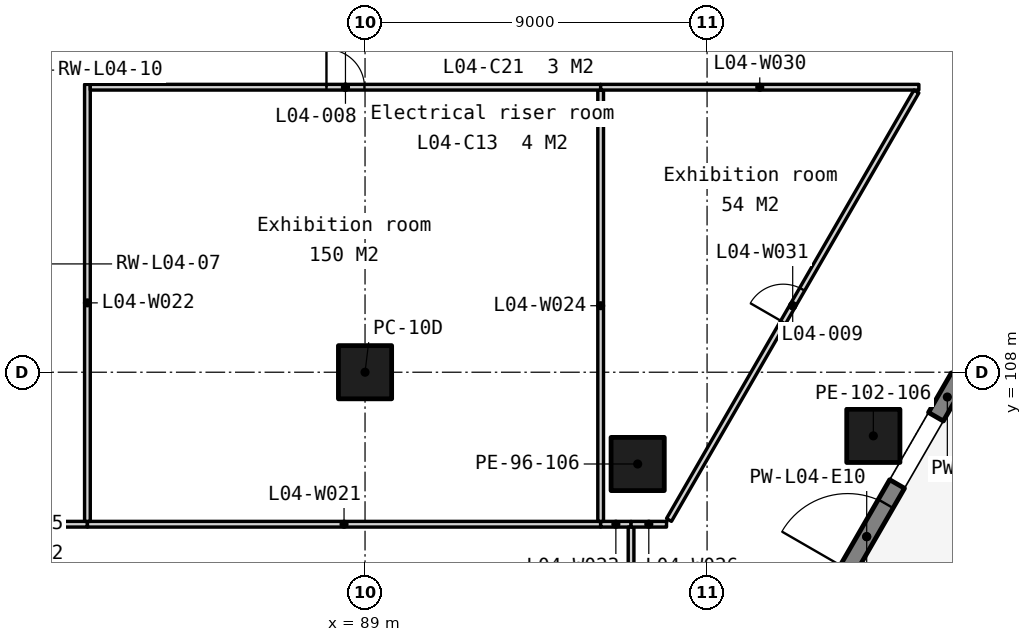
"""IFC4 building model, lengths in metres.
Left out: names, types, materials, properties, quantities, classifications, styles, units other than length and angle.
Written with IfcOpenShell. Run it as: python <this file> out.ifc"""

import sys

from ifc_helpers import new_model, si_unit, direction, frame, frame_2d, origin, origin_2d, place, context, subcontext, project, spatial, rectangle, extrude, element, fill, save


model = new_model("IFC4")
c1 = context("Model", 3, precision=1e-05, world=origin(), true_north=direction((0.0, 1.0)))
c2 = subcontext(c1, "Body", "Model", "MODEL_VIEW")
j1 = project(units=[si_unit("LENGTHUNIT", "METRE"), si_unit("PLANEANGLEUNIT", "RADIAN")], contexts=[c1])
p1 = place(None, origin())
s1 = spatial("IfcSite", under=j1, at=p1, CompositionType="ELEMENT")
p2 = place(p1, origin())
s2 = spatial("IfcBuilding", under=s1, at=p2, CompositionType="ELEMENT")
p3 = place(p2, frame((0.0, 0.0, 25.0)))
s3 = spatial("IfcBuildingStorey", under=s2, at=p3, CompositionType="ELEMENT", Elevation=25.0)
for number, where, z_axis, x_axis in (
    (1, (89.0, 108.0, 0.0), (0.0, 0.0, 1.0), (1.0, 0.0, 0.0)),
    (2, (102.375, 106.325, 0.0), (0.0, 0.0, 1.0), (1.0, 0.0, 0.0)),
    (3, (96.174, 105.585, 0.0), (0.0, 0.0, 1.0), (1.0, 0.0, 0.0)),
):
    element("IfcColumn", number, at=place(p3, frame(where, z_axis=z_axis, x_axis=x_axis)), inside=s3, PredefinedType="COLUMN", context=c2, shape_type="SweptSolid", body=[
        extrude(rectangle(XDim=1.4, YDim=1.4, at=origin_2d()), origin(), (0.0, 0.0, 1.0), 5.0),
    ])
p4 = place(p3, frame((101.4, 102.287, -0.25), z_axis=(0.0, 0.0, 1.0), x_axis=(0.499971222258, 0.866042017984, 0.0)))
e4 = element("IfcWall", 4, at=p4, inside=s3, PredefinedType="SOLIDWALL", context=c2, shape_type="SweptSolid", body=[
    extrude(rectangle(XDim=3.2, YDim=0.45, at=frame_2d((1.6, 0.0))), origin(), (0.0, 0.0, 1.0), 4.262),
])
p5 = place(p4, frame((0.6, 0.0, 0.25)))
e5 = element("IfcOpeningElement", 5, at=p5, cuts=e4, PredefinedType="OPENING", context=c2, shape_type="SweptSolid", body=[
    extrude(rectangle(XDim=2.0, YDim=2.4, at=frame_2d((1.0, 1.2))), frame((0.0, 0.235, 0.0), z_axis=(0.0, -1.0, 0.0), x_axis=(1.0, 0.0, 0.0)), (0.0, 0.0, 1.0), 0.47),
])
p6 = place(p3, frame((104.022, 106.828, -0.25), z_axis=(0.0, 0.0, 1.0), x_axis=(0.500033551112, 0.866006032174, 0.0)))
e6 = element("IfcWall", 6, at=p6, inside=s3, PredefinedType="SOLIDWALL", context=c2, shape_type="SweptSolid", body=[
    extrude(rectangle(XDim=1.2, YDim=0.45, at=frame_2d((0.6, 0.0))), origin(), (0.0, 0.0, 1.0), 4.262),
])
p7 = place(p3, frame((121.754, 129.091, 0.0), z_axis=(0.0, 0.0, 1.0), x_axis=(-0.500000102728, -0.866025344474, 0.0)))
e7 = element("IfcWall", 7, at=p7, inside=s3, PredefinedType="STANDARD", context=c2, shape_type="SweptSolid", body=[
    extrude(rectangle(XDim=77.841, YDim=1.0, at=frame_2d((38.92, 0.0))), origin(), (0.0, 0.0, 1.0), 0.6),
])
p8 = place(p3, frame((64.8, 104.0, 0.0), z_axis=(0.0, 0.0, 1.0), x_axis=(1.0, 0.0, 0.0)))
e8 = element("IfcWall", 8, at=p8, inside=s3, PredefinedType="PARTITIONING", context=c2, shape_type="SweptSolid", body=[
    extrude(rectangle(XDim=16.895, YDim=0.15, at=frame_2d((8.448, 0.0))), origin(), (0.0, 0.0, 1.0), 4.7),
])
p9 = place(p8, frame((7.548, 0.0, 0.0)))
e9 = element("IfcOpeningElement", 9, at=p9, cuts=e8, PredefinedType="OPENING", context=c2, shape_type="SweptSolid", body=[
    extrude(rectangle(XDim=1.8, YDim=2.1, at=frame_2d((0.9, 1.05))), frame((0.0, 0.085, 0.0), z_axis=(0.0, -1.0, 0.0), x_axis=(1.0, 0.0, 0.0)), (0.0, 0.0, 1.0), 0.17),
])
p10 = place(p3, frame((81.695, 104.0, 0.0), z_axis=(0.0, 0.0, 1.0), x_axis=(1.0, 0.0, 0.0)))
e10 = element("IfcWall", 10, at=p10, inside=s3, PredefinedType="PARTITIONING", context=c2, shape_type="SweptSolid", body=[
    extrude(rectangle(XDim=13.505, YDim=0.15, at=frame_2d((6.752, 0.0))), origin(), (0.0, 0.0, 1.0), 4.7),
])
p11 = place(p3, frame((81.695, 104.075, 0.0), z_axis=(0.0, 0.0, 1.0), x_axis=(0.0, 1.0, 0.0)))
e11 = element("IfcWall", 11, at=p11, inside=s3, PredefinedType="PARTITIONING", context=c2, shape_type="SweptSolid", body=[
    extrude(rectangle(XDim=11.5, YDim=0.15, at=frame_2d((5.75, 0.0))), origin(), (0.0, 0.0, 1.0), 4.7),
])
p12 = place(p3, frame((95.2, 104.0, 0.0), z_axis=(0.0, 0.0, 1.0), x_axis=(1.0, 0.0, 0.0)))
e12 = element("IfcWall", 12, at=p12, inside=s3, PredefinedType="PARTITIONING", context=c2, shape_type="SweptSolid", body=[
    extrude(rectangle(XDim=0.8, YDim=0.15, at=frame_2d((0.4, 0.0))), origin(), (0.0, 0.0, 1.0), 4.7),
])
p13 = place(p3, frame((95.2, 104.075, 0.0), z_axis=(0.0, 0.0, 1.0), x_axis=(0.0, 1.0, 0.0)))
e13 = element("IfcWall", 13, at=p13, inside=s3, PredefinedType="PARTITIONING", context=c2, shape_type="SweptSolid", body=[
    extrude(rectangle(XDim=11.35, YDim=0.15, at=frame_2d((5.675, 0.0))), origin(), (0.0, 0.0, 1.0), 4.7),
])
p14 = place(p3, frame((96.0, 101.763, 0.0), z_axis=(0.0, 0.0, 1.0), x_axis=(0.0, 1.0, 0.0)))
e14 = element("IfcWall", 14, at=p14, inside=s3, PredefinedType="PARTITIONING", context=c2, shape_type="SweptSolid", body=[
    extrude(rectangle(XDim=2.162, YDim=0.15, at=frame_2d((1.081, 0.0))), origin(), (0.0, 0.0, 1.0), 4.7),
])
p15 = place(p3, frame((96.0, 104.0, 0.0), z_axis=(0.0, 0.0, 1.0), x_axis=(1.0, 0.0, 0.0)))
e15 = element("IfcWall", 15, at=p15, inside=s3, PredefinedType="PARTITIONING", context=c2, shape_type="SweptSolid", body=[
    extrude(rectangle(XDim=0.933, YDim=0.15, at=frame_2d((0.467, 0.0))), origin(), (0.0, 0.0, 1.0), 4.7),
])
p16 = place(p3, frame((81.77, 115.5, 0.0), z_axis=(0.0, 0.0, 1.0), x_axis=(1.0, 0.0, 0.0)))
e16 = element("IfcWall", 16, at=p16, inside=s3, PredefinedType="PARTITIONING", context=c2, shape_type="SweptSolid", body=[
    extrude(rectangle(XDim=13.43, YDim=0.15, at=frame_2d((6.715, 0.0))), origin(), (0.0, 0.0, 1.0), 4.7),
])
p17 = place(p16, frame((6.215, 0.0, 0.0)))
e17 = element("IfcOpeningElement", 17, at=p17, cuts=e16, PredefinedType="OPENING", context=c2, shape_type="SweptSolid", body=[
    extrude(rectangle(XDim=1.0, YDim=2.1, at=frame_2d((0.5, 1.05))), frame((0.0, 0.085, 0.0), z_axis=(0.0, -1.0, 0.0), x_axis=(1.0, 0.0, 0.0)), (0.0, 0.0, 1.0), 0.17),
])
p18 = place(p3, frame((95.2, 115.5, 0.0), z_axis=(0.0, 0.0, 1.0), x_axis=(1.0, 0.0, 0.0)))
e18 = element("IfcWall", 18, at=p18, inside=s3, PredefinedType="PARTITIONING", context=c2, shape_type="SweptSolid", body=[
    extrude(rectangle(XDim=8.373, YDim=0.15, at=frame_2d((4.187, 0.0))), origin(), (0.0, 0.0, 1.0), 4.7),
])
p19 = place(p3, frame((96.998, 104.113, 0.0), z_axis=(0.0, 0.0, 1.0), x_axis=(0.500011390128, 0.866018827591, 0.0)))
e19 = element("IfcWall", 19, at=p19, inside=s3, PredefinedType="PARTITIONING", context=c2, shape_type="SweptSolid", body=[
    extrude(rectangle(XDim=13.019, YDim=0.15, at=frame_2d((6.51, 0.0))), origin(), (0.0, 0.0, 1.0), 4.7),
])
p20 = place(p19, frame((6.01, 0.0, 0.0)))
e20 = element("IfcOpeningElement", 20, at=p20, cuts=e19, PredefinedType="OPENING", context=c2, shape_type="SweptSolid", body=[
    extrude(rectangle(XDim=1.0, YDim=2.1, at=frame_2d((0.5, 1.05))), frame((0.0, 0.085, 0.0), z_axis=(0.0, -1.0, 0.0), x_axis=(1.0, 0.0, 0.0)), (0.0, 0.0, 1.0), 0.17),
])
p21 = place(p5, origin())
e21 = element("IfcDoor", 21, at=p21, inside=s3, OperationType="DOUBLE_DOOR_SINGLE_SWING", PredefinedType="DOOR", context=c2, shape_type="SweptSolid", body=[
    extrude(rectangle(XDim=2.0, YDim=2.4, at=frame_2d((1.0, 1.2))), frame((0.0, 0.025, 0.0), z_axis=(0.0, -1.0, 0.0), x_axis=(1.0, 0.0, 0.0)), (0.0, 0.0, 1.0), 0.05),
])
fill(e5, e21)
p22 = place(p17, origin())
e22 = element("IfcDoor", 22, at=p22, inside=s3, OperationType="SINGLE_SWING_LEFT", PredefinedType="DOOR", context=c2, shape_type="SweptSolid", body=[
    extrude(rectangle(XDim=1.0, YDim=2.1, at=frame_2d((0.5, 1.05))), frame((0.0, 0.025, 0.0), z_axis=(0.0, -1.0, 0.0), x_axis=(1.0, 0.0, 0.0)), (0.0, 0.0, 1.0), 0.05),
])
fill(e17, e22)
p23 = place(p20, origin())
e23 = element("IfcDoor", 23, at=p23, inside=s3, OperationType="SINGLE_SWING_LEFT", PredefinedType="DOOR", context=c2, shape_type="SweptSolid", body=[
    extrude(rectangle(XDim=1.0, YDim=2.1, at=frame_2d((0.5, 1.05))), frame((0.0, 0.025, 0.0), z_axis=(0.0, -1.0, 0.0), x_axis=(1.0, 0.0, 0.0)), (0.0, 0.0, 1.0), 0.05),
])
fill(e20, e23)
save(model, sys.argv[1])
